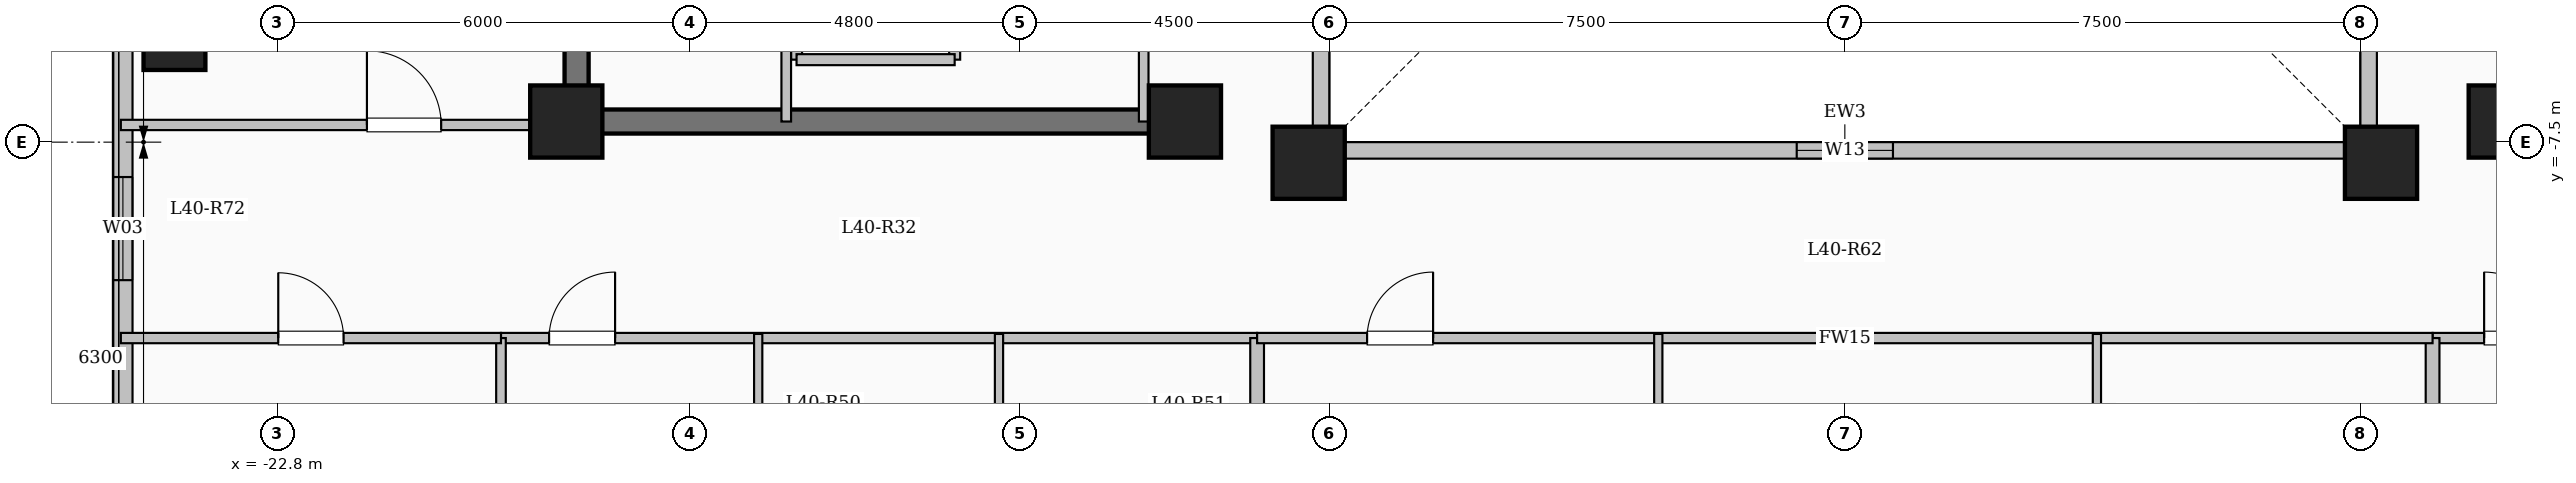
"""IFC4 building model, lengths in metres.
Left out: names, types, materials, properties, quantities, classifications, styles, units other than length and angle.
Written with IfcOpenShell. Run it as: python <this file> out.ifc"""

import sys

from ifc_helpers import new_model, si_unit, direction, frame, frame_2d, origin, origin_2d, place, context, subcontext, project, spatial, rectangle, extrude, element, fill, save


model = new_model("IFC4")
c1 = context("Model", 3, precision=1e-05, world=origin(), true_north=direction((0.0, 1.0)))
c2 = subcontext(c1, "Body", "Model", "MODEL_VIEW")
j1 = project(units=[si_unit("LENGTHUNIT", "METRE"), si_unit("PLANEANGLEUNIT", "RADIAN")], contexts=[c1])
p1 = place(None, origin())
s1 = spatial("IfcSite", under=j1, at=p1, CompositionType="ELEMENT")
p2 = place(p1, origin())
s2 = spatial("IfcBuilding", under=s1, at=p2, CompositionType="ELEMENT")
p3 = place(p2, frame((0.0, 0.0, 149.35)))
s3 = spatial("IfcBuildingStorey", under=s2, at=p3, CompositionType="ELEMENT", Elevation=149.35)
for number, where, z_axis, x_axis in (
    (1, (-7.8, -7.8, 0.0), (0.0, 0.0, 1.0), (1.0, 0.0, 0.0)),
    (2, (7.8, -7.8, 0.0), (0.0, 0.0, 1.0), (1.0, 0.0, 0.0)),
    (3, (-9.6, -7.2, 0.0), (0.0, 0.0, 1.0), (1.0, 0.0, 0.0)),
    (4, (9.6, -7.2, 0.0), (0.0, 0.0, 1.0), (1.0, 0.0, 0.0)),
    (5, (-18.6, -7.2, 0.0), (0.0, 0.0, 1.0), (1.0, 0.0, 0.0)),
):
    element("IfcColumn", number, at=place(p3, frame(where, z_axis=z_axis, x_axis=x_axis)), inside=s3, PredefinedType="COLUMN", context=c2, shape_type="SweptSolid", body=[
        extrude(rectangle(XDim=1.05, YDim=1.05, at=origin_2d()), origin(), (0.0, 0.0, 1.0), 3.35),
    ])
p4 = place(p3, frame((-24.3, -6.0, 0.0), z_axis=(0.0, 0.0, 1.0), x_axis=(1.0, 0.0, 0.0)))
e6 = element("IfcColumn", 6, at=p4, inside=s3, PredefinedType="COLUMN", context=c2, shape_type="SweptSolid", body=[
    extrude(rectangle(XDim=0.9, YDim=0.9, at=origin_2d()), origin(), (0.0, 0.0, 1.0), 3.35),
])
p5 = place(p3, frame((-7.62, -7.62, 0.0), z_axis=(0.0, 0.0, 1.0), x_axis=(1.0, 0.0, 0.0)))
e7 = element("IfcWall", 7, at=p5, inside=s3, PredefinedType="SOLIDWALL", context=c2, shape_type="SweptSolid", body=[
    extrude(rectangle(XDim=15.24, YDim=0.24, at=frame_2d((7.62, 0.0))), origin(), (0.0, 0.0, 1.0), 3.1),
])
p6 = place(p5, frame((6.92, 0.0, 0.95)))
e8 = element("IfcOpeningElement", 8, at=p6, cuts=e7, PredefinedType="OPENING", context=c2, shape_type="SweptSolid", body=[
    extrude(rectangle(XDim=1.4, YDim=1.5, at=frame_2d((0.7, 0.75))), frame((0.0, 0.13, 0.0), z_axis=(0.0, -1.0, 0.0), x_axis=(1.0, 0.0, 0.0)), (0.0, 0.0, 1.0), 0.26),
])
p7 = place(p3, frame((7.62, -7.62, 0.0), z_axis=(0.0, 0.0, 1.0), x_axis=(0.0, 1.0, 0.0)))
e9 = element("IfcWall", 9, at=p7, inside=s3, PredefinedType="SOLIDWALL", context=c2, shape_type="SweptSolid", body=[
    extrude(rectangle(XDim=15.24, YDim=0.24, at=frame_2d((7.62, 0.0))), origin(), (0.0, 0.0, 1.0), 3.1),
])
p8 = place(p7, frame((6.92, 0.0, 0.95)))
e10 = element("IfcOpeningElement", 10, at=p8, cuts=e9, PredefinedType="OPENING", context=c2, shape_type="SweptSolid", body=[
    extrude(rectangle(XDim=1.4, YDim=1.5, at=frame_2d((0.7, 0.75))), frame((0.0, 0.13, 0.0), z_axis=(0.0, -1.0, 0.0), x_axis=(1.0, 0.0, 0.0)), (0.0, 0.0, 1.0), 0.26),
])
p9 = place(p3, frame((-7.62, 7.62, 0.0), z_axis=(0.0, 0.0, 1.0), x_axis=(0.0, -1.0, 0.0)))
e11 = element("IfcWall", 11, at=p9, inside=s3, PredefinedType="SOLIDWALL", context=c2, shape_type="SweptSolid", body=[
    extrude(rectangle(XDim=15.24, YDim=0.24, at=frame_2d((7.62, 0.0))), origin(), (0.0, 0.0, 1.0), 3.1),
])
p10 = place(p9, frame((6.92, 0.0, 0.95)))
e12 = element("IfcOpeningElement", 12, at=p10, cuts=e11, PredefinedType="OPENING", context=c2, shape_type="SweptSolid", body=[
    extrude(rectangle(XDim=1.4, YDim=1.5, at=frame_2d((0.7, 0.75))), frame((0.0, 0.13, 0.0), z_axis=(0.0, -1.0, 0.0), x_axis=(1.0, 0.0, 0.0)), (0.0, 0.0, 1.0), 0.26),
])
p11 = place(p3, frame((-25.05, -17.25, 0.0), z_axis=(0.0, 0.0, 1.0), x_axis=(0.0, 1.0, 0.0)))
e13 = element("IfcWall", 13, at=p11, inside=s3, PredefinedType="SOLIDWALL", context=c2, shape_type="SweptSolid", body=[
    extrude(rectangle(XDim=34.5, YDim=0.28, at=frame_2d((17.25, 0.0))), origin(), (0.0, 0.0, 1.0), 3.1),
])
p12 = place(p11, frame((2.35, 0.0, 0.9)))
e14 = element("IfcOpeningElement", 14, at=p12, cuts=e13, PredefinedType="OPENING", context=c2, shape_type="SweptSolid", body=[
    extrude(rectangle(XDim=2.2, YDim=1.75, at=frame_2d((1.1, 0.875))), frame((0.0, 0.15, 0.0), z_axis=(0.0, -1.0, 0.0), x_axis=(1.0, 0.0, 0.0)), (0.0, 0.0, 1.0), 0.3),
])
p13 = place(p11, frame((7.742, 0.0, 0.9)))
e15 = element("IfcOpeningElement", 15, at=p13, cuts=e13, PredefinedType="OPENING", context=c2, shape_type="SweptSolid", body=[
    extrude(rectangle(XDim=1.5, YDim=1.65, at=frame_2d((0.75, 0.825))), frame((0.0, 0.15, 0.0), z_axis=(0.0, -1.0, 0.0), x_axis=(1.0, 0.0, 0.0)), (0.0, 0.0, 1.0), 0.3),
])
p14 = place(p11, frame((18.0, 0.0, 0.9)))
e16 = element("IfcOpeningElement", 16, at=p14, cuts=e13, PredefinedType="OPENING", context=c2, shape_type="SweptSolid", body=[
    extrude(rectangle(XDim=2.0, YDim=1.7, at=frame_2d((1.0, 0.85))), frame((0.0, 0.15, 0.0), z_axis=(0.0, -1.0, 0.0), x_axis=(1.0, 0.0, 0.0)), (0.0, 0.0, 1.0), 0.3),
])
p15 = place(p11, frame((28.375, 0.0, 0.95)))
e17 = element("IfcOpeningElement", 17, at=p15, cuts=e13, PredefinedType="OPENING", context=c2, shape_type="SweptSolid", body=[
    extrude(rectangle(XDim=1.0, YDim=1.5, at=frame_2d((0.5, 0.75))), frame((0.0, 0.15, 0.0), z_axis=(0.0, -1.0, 0.0), x_axis=(1.0, 0.0, 0.0)), (0.0, 0.0, 1.0), 0.3),
])
p16 = place(p11, frame((31.125, 0.0, 0.9)))
e18 = element("IfcOpeningElement", 18, at=p16, cuts=e13, PredefinedType="OPENING", context=c2, shape_type="SweptSolid", body=[
    extrude(rectangle(XDim=2.0, YDim=1.7, at=frame_2d((1.0, 0.85))), frame((0.0, 0.15, 0.0), z_axis=(0.0, -1.0, 0.0), x_axis=(1.0, 0.0, 0.0)), (0.0, 0.0, 1.0), 0.3),
])
for number, where, z_axis, x_axis in (
    (19, (-15.25, -6.3, 0.0), (0.0, 0.0, 1.0), (0.0, 1.0, 0.0)),
    (20, (-12.95, -6.3, 0.0), (0.0, 0.0, 1.0), (0.0, 1.0, 0.0)),
):
    element("IfcWall", number, at=place(p3, frame(where, z_axis=z_axis, x_axis=x_axis)), inside=s3, PredefinedType="SOLIDWALL", context=c2, shape_type="SweptSolid", body=[
        extrude(rectangle(XDim=2.6, YDim=0.16, at=frame_2d((1.3, 0.0))), origin(), (0.0, 0.0, 1.0), 3.1),
    ])
p17 = place(p3, frame((-15.25, -6.3, 0.0), z_axis=(0.0, 0.0, 1.0), x_axis=(1.0, 0.0, 0.0)))
e21 = element("IfcWall", 21, at=p17, inside=s3, PredefinedType="SOLIDWALL", context=c2, shape_type="SweptSolid", body=[
    extrude(rectangle(XDim=2.3, YDim=0.16, at=frame_2d((1.15, 0.0))), origin(), (0.0, 0.0, 1.0), 3.1),
])
p18 = place(p3, frame((-18.45, -7.375, 0.0), z_axis=(0.0, 0.0, 1.0), x_axis=(0.0, 1.0, 0.0)))
e22 = element("IfcWall", 22, at=p18, inside=s3, PredefinedType="SHEAR", context=c2, shape_type="SweptSolid", body=[
    extrude(rectangle(XDim=14.05, YDim=0.35, at=frame_2d((7.025, 0.0))), origin(), (0.0, 0.0, 1.0), 3.35),
])
p19 = place(p3, frame((-18.625, -7.2, 0.0), z_axis=(0.0, 0.0, 1.0), x_axis=(1.0, 0.0, 0.0)))
e23 = element("IfcWall", 23, at=p19, inside=s3, PredefinedType="SHEAR", context=c2, shape_type="SweptSolid", body=[
    extrude(rectangle(XDim=8.55, YDim=0.35, at=frame_2d((4.275, 0.0))), origin(), (0.0, 0.0, 1.0), 3.35),
])
p20 = place(p3, frame((-15.4, -7.2, 0.0), z_axis=(0.0, 0.0, 1.0), x_axis=(0.0, 1.0, 0.0)))
e24 = element("IfcWall", 24, at=p20, inside=s3, PredefinedType="PARTITIONING", context=c2, shape_type="SweptSolid", body=[
    extrude(rectangle(XDim=10.45, YDim=0.14, at=frame_2d((5.225, 0.0))), origin(), (0.0, 0.0, 1.0), 3.1),
])
p21 = place(p20, frame((9.25, 0.0, 0.0)))
e25 = element("IfcOpeningElement", 25, at=p21, cuts=e24, PredefinedType="OPENING", context=c2, shape_type="SweptSolid", body=[
    extrude(rectangle(XDim=0.9, YDim=2.08, at=frame_2d((0.45, 1.04))), frame((0.0, 0.08, 0.0), z_axis=(0.0, -1.0, 0.0), x_axis=(1.0, 0.0, 0.0)), (0.0, 0.0, 1.0), 0.16),
])
p22 = place(p3, frame((-10.2, -7.2, 0.0), z_axis=(0.0, 0.0, 1.0), x_axis=(0.0, 1.0, 0.0)))
e26 = element("IfcWall", 26, at=p22, inside=s3, PredefinedType="PARTITIONING", context=c2, shape_type="SweptSolid", body=[
    extrude(rectangle(XDim=9.12, YDim=0.14, at=frame_2d((4.56, 0.0))), origin(), (0.0, 0.0, 1.0), 3.1),
])
p23 = place(p22, frame((1.9, 0.0, 0.0)))
e27 = element("IfcOpeningElement", 27, at=p23, cuts=e26, PredefinedType="OPENING", context=c2, shape_type="SweptSolid", body=[
    extrude(rectangle(XDim=0.95, YDim=2.12, at=frame_2d((0.475, 1.06))), frame((0.0, 0.08, 0.0), z_axis=(0.0, -1.0, 0.0), x_axis=(1.0, 0.0, 0.0)), (0.0, 0.0, 1.0), 0.16),
])
p24 = place(p22, frame((7.75, 0.0, 0.0)))
e28 = element("IfcOpeningElement", 28, at=p24, cuts=e26, PredefinedType="OPENING", context=c2, shape_type="SweptSolid", body=[
    extrude(rectangle(XDim=0.95, YDim=2.12, at=frame_2d((0.475, 1.06))), frame((0.0, 0.08, 0.0), z_axis=(0.0, -1.0, 0.0), x_axis=(1.0, 0.0, 0.0)), (0.0, 0.0, 1.0), 0.16),
])
p25 = place(p3, frame((-19.55, -10.35, 0.0), z_axis=(0.0, 0.0, 1.0), x_axis=(1.0, 0.0, 0.0)))
e29 = element("IfcWall", 29, at=p25, inside=s3, PredefinedType="PARTITIONING", context=c2, shape_type="SweptSolid", body=[
    extrude(rectangle(XDim=11.0, YDim=0.15, at=frame_2d((5.5, 0.0))), origin(), (0.0, 0.0, 1.0), 3.1),
])
p26 = place(p25, frame((0.7, 0.0, 0.0)))
e30 = element("IfcOpeningElement", 30, at=p26, cuts=e29, PredefinedType="OPENING", context=c2, shape_type="SweptSolid", body=[
    extrude(rectangle(XDim=0.96, YDim=2.15, at=frame_2d((0.48, 1.075))), frame((0.0, 0.085, 0.0), z_axis=(0.0, -1.0, 0.0), x_axis=(1.0, 0.0, 0.0)), (0.0, 0.0, 1.0), 0.17),
])
p27 = place(p3, frame((8.55, -10.35, 0.0), z_axis=(0.0, 0.0, 1.0), x_axis=(1.0, 0.0, 0.0)))
e31 = element("IfcWall", 31, at=p27, inside=s3, PredefinedType="PARTITIONING", context=c2, shape_type="SweptSolid", body=[
    extrude(rectangle(XDim=11.0, YDim=0.15, at=frame_2d((5.5, 0.0))), origin(), (0.0, 0.0, 1.0), 3.1),
])
p28 = place(p27, frame((0.75, 0.0, 0.0)))
e32 = element("IfcOpeningElement", 32, at=p28, cuts=e31, PredefinedType="OPENING", context=c2, shape_type="SweptSolid", body=[
    extrude(rectangle(XDim=0.96, YDim=2.15, at=frame_2d((0.48, 1.075))), frame((0.0, 0.085, 0.0), z_axis=(0.0, -1.0, 0.0), x_axis=(1.0, 0.0, 0.0)), (0.0, 0.0, 1.0), 0.17),
])
p29 = place(p3, frame((-15.808, -21.2, 0.0), z_axis=(0.0, 0.0, 1.0), x_axis=(0.0, 1.0, 0.0)))
e33 = element("IfcWall", 33, at=p29, inside=s3, PredefinedType="PARTITIONING", context=c2, shape_type="SweptSolid", body=[
    extrude(rectangle(XDim=10.91, YDim=0.12, at=frame_2d((5.455, 0.0))), origin(), (0.0, 0.0, 1.0), 3.1),
])
p30 = place(p29, frame((6.575, 0.0, 0.0)))
e34 = element("IfcOpeningElement", 34, at=p30, cuts=e33, PredefinedType="OPENING", context=c2, shape_type="SweptSolid", body=[
    extrude(rectangle(XDim=1.08, YDim=2.15, at=frame_2d((0.54, 1.075))), frame((0.0, 0.07, 0.0), z_axis=(0.0, -1.0, 0.0), x_axis=(1.0, 0.0, 0.0)), (0.0, 0.0, 1.0), 0.14),
])
p31 = place(p3, frame((-12.305, -13.26, 0.0), z_axis=(0.0, 0.0, 1.0), x_axis=(0.0, 1.0, 0.0)))
e35 = element("IfcWall", 35, at=p31, inside=s3, PredefinedType="PARTITIONING", context=c2, shape_type="SweptSolid", body=[
    extrude(rectangle(XDim=2.97, YDim=0.12, at=frame_2d((1.485, 0.0))), origin(), (0.0, 0.0, 1.0), 3.1),
])
for number, where, z_axis, x_axis in (
    (36, (-8.55, -21.804, 0.0), (0.0, 0.0, 1.0), (0.0, 1.0, 0.0)),
    (37, (8.55, -21.804, 0.0), (0.0, 0.0, 1.0), (0.0, 1.0, 0.0)),
):
    element("IfcWall", number, at=place(p3, frame(where, z_axis=z_axis, x_axis=x_axis)), inside=s3, PredefinedType="SOLIDWALL", context=c2, shape_type="SweptSolid", body=[
        extrude(rectangle(XDim=11.454, YDim=0.2, at=frame_2d((5.727, 0.0))), origin(), (0.0, 0.0, 1.0), 3.1),
    ])
p32 = place(p3, frame((-8.55, -10.35, 0.0), z_axis=(0.0, 0.0, 1.0), x_axis=(1.0, 0.0, 0.0)))
e38 = element("IfcWall", 38, at=p32, inside=s3, PredefinedType="PARTITIONING", context=c2, shape_type="SweptSolid", body=[
    extrude(rectangle(XDim=17.1, YDim=0.15, at=frame_2d((8.55, 0.0))), origin(), (0.0, 0.0, 1.0), 3.1),
])
p33 = place(p32, frame((1.6, 0.0, 0.0)))
e39 = element("IfcOpeningElement", 39, at=p33, cuts=e38, PredefinedType="OPENING", context=c2, shape_type="SweptSolid", body=[
    extrude(rectangle(XDim=0.96, YDim=2.15, at=frame_2d((0.48, 1.075))), frame((0.0, 0.085, 0.0), z_axis=(0.0, -1.0, 0.0), x_axis=(1.0, 0.0, 0.0)), (0.0, 0.0, 1.0), 0.17),
])
p34 = place(p3, frame((-2.714, -22.68, 0.0), z_axis=(0.0, 0.0, 1.0), x_axis=(0.0, 1.0, 0.0)))
e40 = element("IfcWall", 40, at=p34, inside=s3, PredefinedType="PARTITIONING", context=c2, shape_type="SweptSolid", body=[
    extrude(rectangle(XDim=12.39, YDim=0.12, at=frame_2d((6.195, 0.0))), origin(), (0.0, 0.0, 1.0), 3.1),
])
p35 = place(p34, frame((8.395, 0.0, 0.0)))
e41 = element("IfcOpeningElement", 41, at=p35, cuts=e40, PredefinedType="OPENING", context=c2, shape_type="SweptSolid", body=[
    extrude(rectangle(XDim=1.08, YDim=2.15, at=frame_2d((0.54, 1.075))), frame((0.0, 0.07, 0.0), z_axis=(0.0, -1.0, 0.0), x_axis=(1.0, 0.0, 0.0)), (0.0, 0.0, 1.0), 0.14),
])
p36 = place(p3, frame((3.667, -12.92, 0.0), z_axis=(0.0, 0.0, 1.0), x_axis=(0.0, 1.0, 0.0)))
e42 = element("IfcWall", 42, at=p36, inside=s3, PredefinedType="PARTITIONING", context=c2, shape_type="SweptSolid", body=[
    extrude(rectangle(XDim=2.63, YDim=0.12, at=frame_2d((1.315, 0.0))), origin(), (0.0, 0.0, 1.0), 3.1),
])
p37 = place(p3, frame((-25.08, -7.25, 0.0), z_axis=(0.0, 0.0, 1.0), x_axis=(1.0, 0.0, 0.0)))
e43 = element("IfcWall", 43, at=p37, inside=s3, PredefinedType="PARTITIONING", context=c2, shape_type="SweptSolid", body=[
    extrude(rectangle(XDim=6.63, YDim=0.15, at=frame_2d((3.315, 0.0))), origin(), (0.0, 0.0, 1.0), 3.1),
])
p38 = place(p37, frame((3.58, 0.0, 0.0)))
e44 = element("IfcOpeningElement", 44, at=p38, cuts=e43, PredefinedType="OPENING", context=c2, shape_type="SweptSolid", body=[
    extrude(rectangle(XDim=1.08, YDim=2.15, at=frame_2d((0.54, 1.075))), frame((0.0, 0.085, 0.0), z_axis=(0.0, -1.0, 0.0), x_axis=(1.0, 0.0, 0.0)), (0.0, 0.0, 1.0), 0.17),
])
p39 = place(p3, frame((-19.55, -17.25, 0.0), z_axis=(0.0, 0.0, 1.0), x_axis=(0.0, 1.0, 0.0)))
e45 = element("IfcWall", 45, at=p39, inside=s3, PredefinedType="PARTITIONING", context=c2, shape_type="SweptSolid", body=[
    extrude(rectangle(XDim=6.9, YDim=0.14, at=frame_2d((3.45, 0.0))), origin(), (0.0, 0.0, 1.0), 3.1),
])
p40 = place(p3, frame((-25.08, -10.35, 0.0), z_axis=(0.0, 0.0, 1.0), x_axis=(1.0, 0.0, 0.0)))
e46 = element("IfcWall", 46, at=p40, inside=s3, PredefinedType="PARTITIONING", context=c2, shape_type="SweptSolid", body=[
    extrude(rectangle(XDim=5.53, YDim=0.15, at=frame_2d((2.765, 0.0))), origin(), (0.0, 0.0, 1.0), 3.1),
])
p41 = place(p40, frame((2.29, 0.0, 0.0)))
e47 = element("IfcOpeningElement", 47, at=p41, cuts=e46, PredefinedType="OPENING", context=c2, shape_type="SweptSolid", body=[
    extrude(rectangle(XDim=0.95, YDim=2.15, at=frame_2d((0.475, 1.075))), frame((0.0, 0.085, 0.0), z_axis=(0.0, -1.0, 0.0), x_axis=(1.0, 0.0, 0.0)), (0.0, 0.0, 1.0), 0.17),
])
p42 = place(p6, origin())
e48 = element("IfcWindow", 48, at=p42, inside=s3, PartitioningType="SINGLE_PANEL", PredefinedType="WINDOW", context=c2, shape_type="SweptSolid", body=[
    extrude(rectangle(XDim=1.4, YDim=1.5, at=frame_2d((0.7, 0.75))), frame((0.0, 0.03, 0.0), z_axis=(0.0, -1.0, 0.0), x_axis=(1.0, 0.0, 0.0)), (0.0, 0.0, 1.0), 0.06),
])
fill(e8, e48)
p43 = place(p13, origin())
e49 = element("IfcWindow", 49, at=p43, inside=s3, PartitioningType="SINGLE_PANEL", PredefinedType="WINDOW", context=c2, shape_type="SweptSolid", body=[
    extrude(rectangle(XDim=1.5, YDim=1.65, at=frame_2d((0.75, 0.825))), frame((0.0, 0.03, 0.0), z_axis=(0.0, -1.0, 0.0), x_axis=(1.0, 0.0, 0.0)), (0.0, 0.0, 1.0), 0.06),
])
fill(e15, e49)
p44 = place(p26, origin())
e50 = element("IfcDoor", 50, at=p44, inside=s3, OperationType="SINGLE_SWING_RIGHT", PredefinedType="DOOR", context=c2, shape_type="SweptSolid", body=[
    extrude(rectangle(XDim=0.96, YDim=2.15, at=frame_2d((0.48, 1.075))), frame((0.0, 0.025, 0.0), z_axis=(0.0, -1.0, 0.0), x_axis=(1.0, 0.0, 0.0)), (0.0, 0.0, 1.0), 0.05),
])
fill(e30, e50)
p45 = place(p28, origin())
e51 = element("IfcDoor", 51, at=p45, inside=s3, OperationType="SINGLE_SWING_LEFT", PredefinedType="DOOR", context=c2, shape_type="SweptSolid", body=[
    extrude(rectangle(XDim=0.96, YDim=2.15, at=frame_2d((0.48, 1.075))), frame((0.0, 0.025, 0.0), z_axis=(0.0, -1.0, 0.0), x_axis=(1.0, 0.0, 0.0)), (0.0, 0.0, 1.0), 0.05),
])
fill(e32, e51)
p46 = place(p33, origin())
e52 = element("IfcDoor", 52, at=p46, inside=s3, OperationType="SINGLE_SWING_RIGHT", PredefinedType="DOOR", context=c2, shape_type="SweptSolid", body=[
    extrude(rectangle(XDim=0.96, YDim=2.15, at=frame_2d((0.48, 1.075))), frame((0.0, 0.025, 0.0), z_axis=(0.0, -1.0, 0.0), x_axis=(1.0, 0.0, 0.0)), (0.0, 0.0, 1.0), 0.05),
])
fill(e39, e52)
p47 = place(p41, origin())
e53 = element("IfcDoor", 53, at=p47, inside=s3, OperationType="SINGLE_SWING_LEFT", PredefinedType="DOOR", context=c2, shape_type="SweptSolid", body=[
    extrude(rectangle(XDim=0.95, YDim=2.15, at=frame_2d((0.475, 1.075))), frame((0.0, 0.025, 0.0), z_axis=(0.0, -1.0, 0.0), x_axis=(1.0, 0.0, 0.0)), (0.0, 0.0, 1.0), 0.05),
])
fill(e47, e53)
p48 = place(p38, origin())
e54 = element("IfcDoor", 54, at=p48, inside=s3, OperationType="SINGLE_SWING_LEFT", PredefinedType="DOOR", context=c2, shape_type="SweptSolid", body=[
    extrude(rectangle(XDim=1.08, YDim=2.15, at=frame_2d((0.54, 1.075))), frame((0.0, 0.025, 0.0), z_axis=(0.0, -1.0, 0.0), x_axis=(1.0, 0.0, 0.0)), (0.0, 0.0, 1.0), 0.05),
])
fill(e44, e54)
save(model, sys.argv[1])
